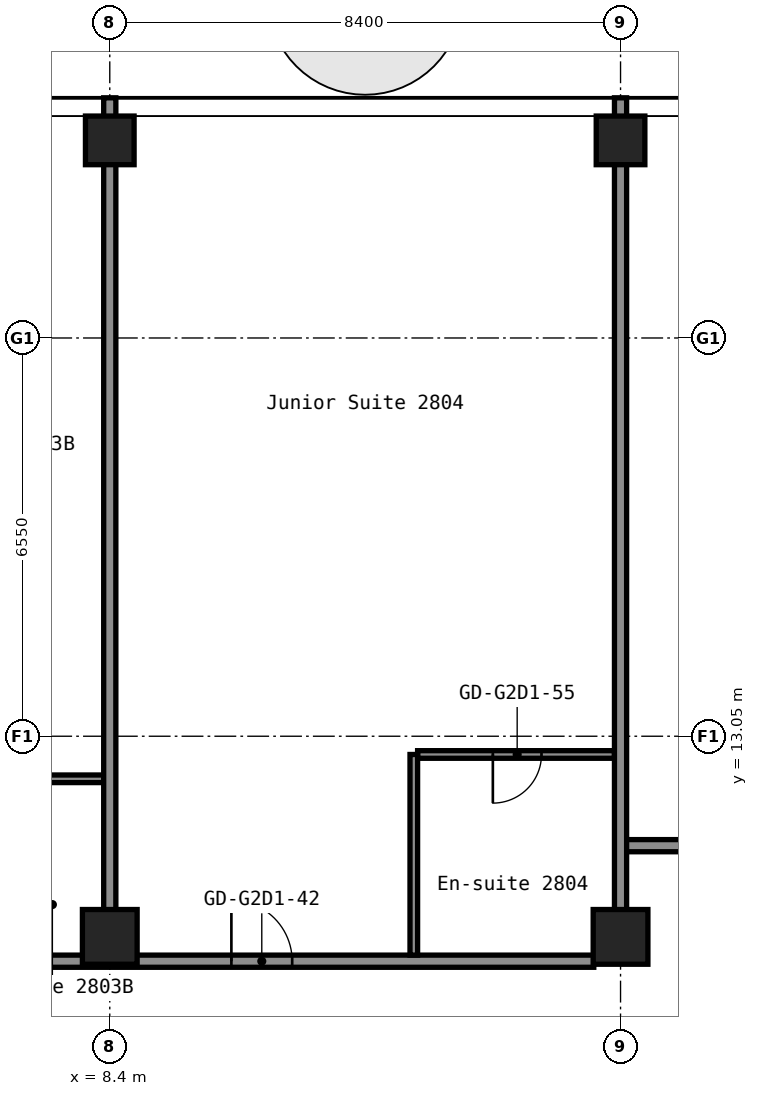
"""IFC4 building model, lengths in metres.
Left out: names, types, materials, properties, quantities, classifications, styles, units other than length and angle.
Written with IfcOpenShell. Run it as: python <this file> out.ifc"""

import sys

from ifc_helpers import new_model, si_unit, direction, frame, frame_2d, origin, origin_2d, place, context, subcontext, project, spatial, rectangle, hollow_rectangle, extrude, element, fill, save


model = new_model("IFC4")
c1 = context("Model", 3, precision=1e-05, world=origin(), true_north=direction((0.0, 1.0)))
c2 = subcontext(c1, "Body", "Model", "MODEL_VIEW")
j1 = project(units=[si_unit("LENGTHUNIT", "METRE"), si_unit("PLANEANGLEUNIT", "RADIAN")], contexts=[c1])
p1 = place(None, origin())
s1 = spatial("IfcSite", under=j1, at=p1, CompositionType="ELEMENT")
p2 = place(p1, origin())
s2 = spatial("IfcBuilding", under=s1, at=p2, CompositionType="ELEMENT")
p3 = place(p2, frame((0.0, 0.0, 101.0)))
s3 = spatial("IfcBuildingStorey", under=s2, at=p3, CompositionType="ELEMENT", Elevation=101.0)
p4 = place(p3, frame((8.4, 9.75, 0.0), z_axis=(0.0, 0.0, 1.0), x_axis=(1.0, 0.0, 0.0)))
e1 = element("IfcColumn", 1, at=p4, inside=s3, PredefinedType="COLUMN", context=c2, shape_type="SweptSolid", body=[
    extrude(hollow_rectangle(XDim=0.9, YDim=0.9, WallThickness=0.036, at=origin_2d()), origin(), (0.0, 0.0, 1.0), 2.8),
])
p5 = place(p3, frame((8.4, 22.85, 0.0), z_axis=(0.0, 0.0, 1.0), x_axis=(1.0, 0.0, 0.0)))
e2 = element("IfcColumn", 2, at=p5, inside=s3, PredefinedType="COLUMN", context=c2, shape_type="SweptSolid", body=[
    extrude(hollow_rectangle(XDim=0.8, YDim=0.8, WallThickness=0.032, at=origin_2d()), origin(), (0.0, 0.0, 1.0), 2.8),
])
p6 = place(p3, frame((16.8, 9.75, 0.0), z_axis=(0.0, 0.0, 1.0), x_axis=(1.0, 0.0, 0.0)))
e3 = element("IfcColumn", 3, at=p6, inside=s3, PredefinedType="COLUMN", context=c2, shape_type="SweptSolid", body=[
    extrude(hollow_rectangle(XDim=0.9, YDim=0.9, WallThickness=0.036, at=origin_2d()), origin(), (0.0, 0.0, 1.0), 2.8),
])
p7 = place(p3, frame((16.8, 22.85, 0.0), z_axis=(0.0, 0.0, 1.0), x_axis=(1.0, 0.0, 0.0)))
e4 = element("IfcColumn", 4, at=p7, inside=s3, PredefinedType="COLUMN", context=c2, shape_type="SweptSolid", body=[
    extrude(hollow_rectangle(XDim=0.8, YDim=0.8, WallThickness=0.032, at=origin_2d()), origin(), (0.0, 0.0, 1.0), 2.8),
])
p8 = place(p3, frame((-16.36, 9.35, 0.0), z_axis=(0.0, 0.0, 1.0), x_axis=(1.0, 0.0, 0.0)))
e5 = element("IfcWall", 5, at=p8, inside=s3, PredefinedType="PARTITIONING", context=c2, shape_type="SweptSolid", body=[
    extrude(rectangle(XDim=32.72, YDim=0.2, at=frame_2d((16.36, 0.0))), origin(), (0.0, 0.0, 1.0), 2.8),
])
p9 = place(p8, frame((2.41, 0.0, 0.0)))
e6 = element("IfcOpeningElement", 6, at=p9, cuts=e5, PredefinedType="OPENING", context=c2, shape_type="SweptSolid", body=[
    extrude(rectangle(XDim=1.0, YDim=2.1, at=frame_2d((0.5, 1.05))), frame((0.0, 0.11, 0.0), z_axis=(0.0, -1.0, 0.0), x_axis=(1.0, 0.0, 0.0)), (0.0, 0.0, 1.0), 0.22),
])
p10 = place(p8, frame((4.11, 0.0, 0.0)))
e7 = element("IfcOpeningElement", 7, at=p10, cuts=e5, PredefinedType="OPENING", context=c2, shape_type="SweptSolid", body=[
    extrude(rectangle(XDim=1.0, YDim=2.1, at=frame_2d((0.5, 1.05))), frame((0.0, 0.11, 0.0), z_axis=(0.0, -1.0, 0.0), x_axis=(1.0, 0.0, 0.0)), (0.0, 0.0, 1.0), 0.22),
])
p11 = place(p8, frame((13.36, 0.0, 0.0)))
e8 = element("IfcOpeningElement", 8, at=p11, cuts=e5, PredefinedType="OPENING", context=c2, shape_type="SweptSolid", body=[
    extrude(rectangle(XDim=1.0, YDim=2.1, at=frame_2d((0.5, 1.05))), frame((0.0, 0.11, 0.0), z_axis=(0.0, -1.0, 0.0), x_axis=(1.0, 0.0, 0.0)), (0.0, 0.0, 1.0), 0.22),
])
p12 = place(p8, frame((19.21, 0.0, 0.0)))
e9 = element("IfcOpeningElement", 9, at=p12, cuts=e5, PredefinedType="OPENING", context=c2, shape_type="SweptSolid", body=[
    extrude(rectangle(XDim=1.0, YDim=2.1, at=frame_2d((0.5, 1.05))), frame((0.0, 0.11, 0.0), z_axis=(0.0, -1.0, 0.0), x_axis=(1.0, 0.0, 0.0)), (0.0, 0.0, 1.0), 0.22),
])
p13 = place(p8, frame((20.91, 0.0, 0.0)))
e10 = element("IfcOpeningElement", 10, at=p13, cuts=e5, PredefinedType="OPENING", context=c2, shape_type="SweptSolid", body=[
    extrude(rectangle(XDim=1.0, YDim=2.1, at=frame_2d((0.5, 1.05))), frame((0.0, 0.11, 0.0), z_axis=(0.0, -1.0, 0.0), x_axis=(1.0, 0.0, 0.0)), (0.0, 0.0, 1.0), 0.22),
])
p14 = place(p8, frame((26.76, 0.0, 0.0)))
e11 = element("IfcOpeningElement", 11, at=p14, cuts=e5, PredefinedType="OPENING", context=c2, shape_type="SweptSolid", body=[
    extrude(rectangle(XDim=1.0, YDim=2.1, at=frame_2d((0.5, 1.05))), frame((0.0, 0.11, 0.0), z_axis=(0.0, -1.0, 0.0), x_axis=(1.0, 0.0, 0.0)), (0.0, 0.0, 1.0), 0.22),
])
p15 = place(p3, frame((16.8, 11.25, 0.0), z_axis=(0.0, 0.0, 1.0), x_axis=(1.0, 0.0, 0.0)))
e12 = element("IfcWall", 12, at=p15, inside=s3, PredefinedType="PARTITIONING", context=c2, shape_type="SweptSolid", body=[
    extrude(rectangle(XDim=29.7, YDim=0.2, at=frame_2d((14.85, 0.0))), origin(), (0.0, 0.0, 1.0), 2.8),
])
p16 = place(p15, frame((3.4, 0.0, 0.0)))
e13 = element("IfcOpeningElement", 13, at=p16, cuts=e12, PredefinedType="OPENING", context=c2, shape_type="SweptSolid", body=[
    extrude(rectangle(XDim=1.6, YDim=2.1, at=frame_2d((0.8, 1.05))), frame((0.0, 0.11, 0.0), z_axis=(0.0, -1.0, 0.0), x_axis=(1.0, 0.0, 0.0)), (0.0, 0.0, 1.0), 0.22),
])
p17 = place(p15, frame((11.8, 0.0, 0.0)))
e14 = element("IfcOpeningElement", 14, at=p17, cuts=e12, PredefinedType="OPENING", context=c2, shape_type="SweptSolid", body=[
    extrude(rectangle(XDim=1.6, YDim=2.1, at=frame_2d((0.8, 1.05))), frame((0.0, 0.11, 0.0), z_axis=(0.0, -1.0, 0.0), x_axis=(1.0, 0.0, 0.0)), (0.0, 0.0, 1.0), 0.22),
])
p18 = place(p15, frame((20.2, 0.0, 0.0)))
e15 = element("IfcOpeningElement", 15, at=p18, cuts=e12, PredefinedType="OPENING", context=c2, shape_type="SweptSolid", body=[
    extrude(rectangle(XDim=1.6, YDim=2.1, at=frame_2d((0.8, 1.05))), frame((0.0, 0.11, 0.0), z_axis=(0.0, -1.0, 0.0), x_axis=(1.0, 0.0, 0.0)), (0.0, 0.0, 1.0), 0.22),
])
p19 = place(p15, frame((26.85, 0.0, 0.0)))
e16 = element("IfcOpeningElement", 16, at=p19, cuts=e12, PredefinedType="OPENING", context=c2, shape_type="SweptSolid", body=[
    extrude(rectangle(XDim=0.9, YDim=2.1, at=frame_2d((0.45, 1.05))), frame((0.0, 0.11, 0.0), z_axis=(0.0, -1.0, 0.0), x_axis=(1.0, 0.0, 0.0)), (0.0, 0.0, 1.0), 0.22),
])
p20 = place(p3, frame((5.962, 12.35, 0.0), z_axis=(0.0, 0.0, 1.0), x_axis=(1.0, 0.0, 0.0)))
e17 = element("IfcWall", 17, at=p20, inside=s3, PredefinedType="PARTITIONING", context=c2, shape_type="SweptSolid", body=[
    extrude(rectangle(XDim=2.338, YDim=0.125, at=frame_2d((1.169, 0.0))), origin(), (0.0, 0.0, 1.0), 2.8),
])
p21 = place(p3, frame((13.462, 12.75, 0.0), z_axis=(0.0, 0.0, 1.0), x_axis=(1.0, 0.0, 0.0)))
e18 = element("IfcWall", 18, at=p21, inside=s3, PredefinedType="PARTITIONING", context=c2, shape_type="SweptSolid", body=[
    extrude(rectangle(XDim=3.238, YDim=0.125, at=frame_2d((1.619, 0.0))), origin(), (0.0, 0.0, 1.0), 2.8),
])
p22 = place(p21, frame((1.238, 0.0, 0.0)))
e19 = element("IfcOpeningElement", 19, at=p22, cuts=e18, PredefinedType="OPENING", context=c2, shape_type="SweptSolid", body=[
    extrude(rectangle(XDim=0.8, YDim=2.1, at=frame_2d((0.4, 1.05))), frame((0.0, 0.073, 0.0), z_axis=(0.0, -1.0, 0.0), x_axis=(1.0, 0.0, 0.0)), (0.0, 0.0, 1.0), 0.145),
])
p23 = place(p3, frame((8.4, 10.19, 0.0), z_axis=(0.0, 0.0, 1.0), x_axis=(0.0, 1.0, 0.0)))
e20 = element("IfcWall", 20, at=p23, inside=s3, PredefinedType="PARTITIONING", context=c2, shape_type="SweptSolid", body=[
    extrude(rectangle(XDim=13.36, YDim=0.2, at=frame_2d((6.68, 0.0))), origin(), (0.0, 0.0, 1.0), 2.8),
])
p24 = place(p3, frame((13.4, 9.45, 0.0), z_axis=(0.0, 0.0, 1.0), x_axis=(0.0, 1.0, 0.0)))
e21 = element("IfcWall", 21, at=p24, inside=s3, PredefinedType="PARTITIONING", context=c2, shape_type="SweptSolid", body=[
    extrude(rectangle(XDim=3.3, YDim=0.125, at=frame_2d((1.65, 0.0))), origin(), (0.0, 0.0, 1.0), 2.8),
])
p25 = place(p3, frame((16.8, 10.19, 0.0), z_axis=(0.0, 0.0, 1.0), x_axis=(0.0, 1.0, 0.0)))
e22 = element("IfcWall", 22, at=p25, inside=s3, PredefinedType="PARTITIONING", context=c2, shape_type="SweptSolid", body=[
    extrude(rectangle(XDim=13.36, YDim=0.2, at=frame_2d((6.68, 0.0))), origin(), (0.0, 0.0, 1.0), 2.8),
])
p26 = place(p14, origin())
e23 = element("IfcDoor", 23, at=p26, inside=s3, OperationType="SINGLE_SWING_RIGHT", PredefinedType="DOOR", context=c2, shape_type="SweptSolid", body=[
    extrude(rectangle(XDim=1.0, YDim=2.1, at=frame_2d((0.5, 1.05))), frame((0.0, 0.025, 0.0), z_axis=(0.0, -1.0, 0.0), x_axis=(1.0, 0.0, 0.0)), (0.0, 0.0, 1.0), 0.05),
])
fill(e11, e23)
p27 = place(p22, origin())
e24 = element("IfcDoor", 24, at=p27, inside=s3, OperationType="SINGLE_SWING_LEFT", PredefinedType="DOOR", context=c2, shape_type="SweptSolid", body=[
    extrude(rectangle(XDim=0.8, YDim=2.1, at=frame_2d((0.4, 1.05))), frame((0.0, 0.025, 0.0), z_axis=(0.0, -1.0, 0.0), x_axis=(1.0, 0.0, 0.0)), (0.0, 0.0, 1.0), 0.05),
])
fill(e19, e24)
save(model, sys.argv[1])
